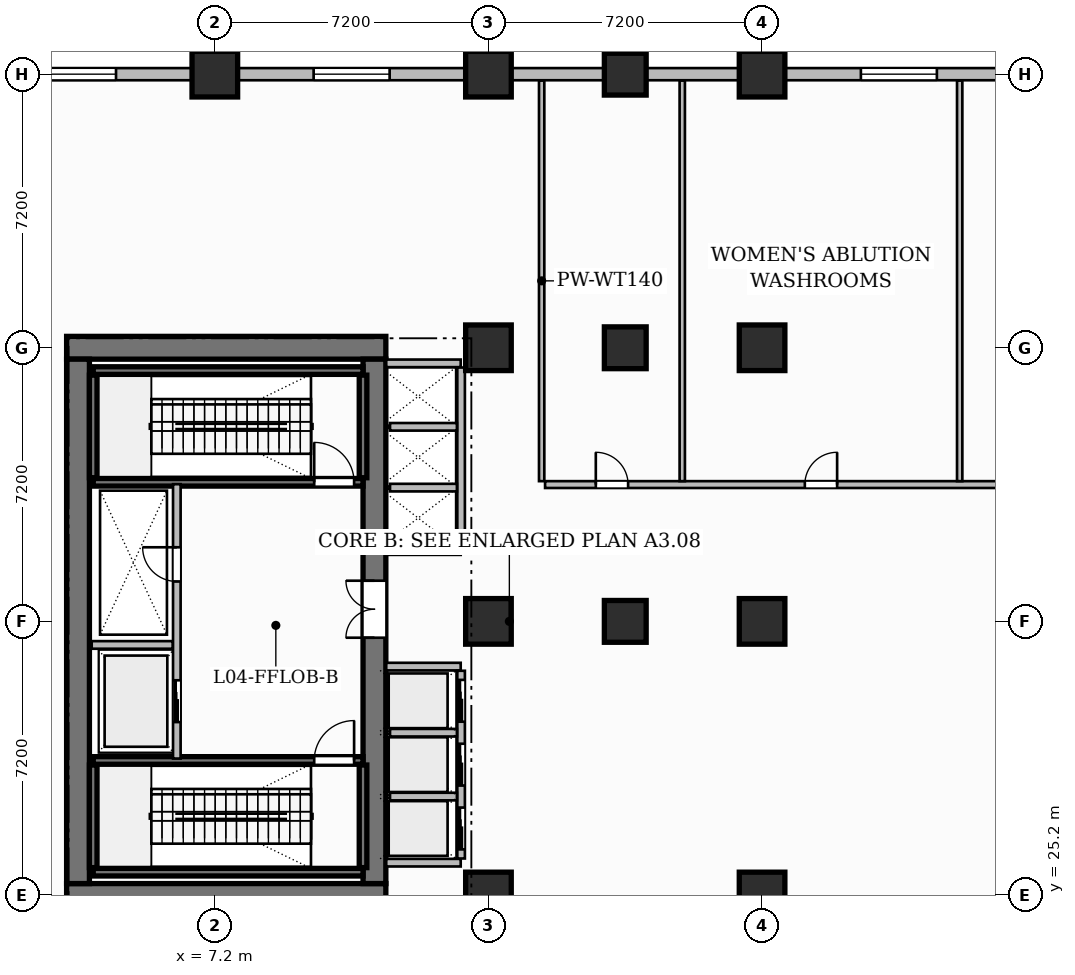
"""IFC4 building model, lengths in metres.
Left out: names, types, materials, properties, quantities, classifications, styles, units other than length and angle.
Written with IfcOpenShell. Run it as: python <this file> out.ifc"""

import sys

from ifc_helpers import new_model, si_unit, direction, frame, frame_2d, origin, origin_2d, place, context, subcontext, project, spatial, rectangle, extrude, source, transform, mapped, element, fill, save


model = new_model("IFC4")
c1 = context("Model", 3, precision=1e-05, world=origin(), true_north=direction((0.0, 1.0)))
c2 = subcontext(c1, "Body", "Model", "MODEL_VIEW")
j1 = project(units=[si_unit("LENGTHUNIT", "METRE"), si_unit("PLANEANGLEUNIT", "RADIAN")], contexts=[c1])
p1 = place(None, origin())
s1 = spatial("IfcSite", under=j1, at=p1, CompositionType="ELEMENT")
p2 = place(p1, origin())
s2 = spatial("IfcBuilding", under=s1, at=p2, CompositionType="ELEMENT")
p3 = place(p2, frame((0.0, 0.0, 21.6)))
s3 = spatial("IfcBuildingStorey", under=s2, at=p3, CompositionType="ELEMENT", Elevation=21.6)
for number, where, z_axis, x_axis in (
    (1, (3.3, 25.2, 0.0), (0.0, 0.0, 1.0), (1.0, 0.0, 0.0)),
    (2, (3.3, 39.6, 0.0), (0.0, 0.0, 1.0), (1.0, 0.0, 0.0)),
):
    element("IfcWall", number, at=place(p3, frame(where, z_axis=z_axis, x_axis=x_axis)), inside=s3, PredefinedType="SHEAR", context=c2, shape_type="SweptSolid", body=[
        extrude(rectangle(XDim=8.4, YDim=0.6, at=frame_2d((4.2, 0.0))), origin(), (0.0, 0.0, 1.0), 5.4),
    ])
p4 = place(p3, frame((3.6, 25.5, 0.0), z_axis=(0.0, 0.0, 1.0), x_axis=(0.0, 1.0, 0.0)))
e3 = element("IfcWall", 3, at=p4, inside=s3, PredefinedType="SHEAR", context=c2, shape_type="SweptSolid", body=[
    extrude(rectangle(XDim=13.8, YDim=0.6, at=frame_2d((6.9, 0.0))), origin(), (0.0, 0.0, 1.0), 5.4),
])
p5 = place(p3, frame((11.4, 25.5, 0.0), z_axis=(0.0, 0.0, 1.0), x_axis=(0.0, 1.0, 0.0)))
e4 = element("IfcWall", 4, at=p5, inside=s3, PredefinedType="SHEAR", context=c2, shape_type="SweptSolid", body=[
    extrude(rectangle(XDim=13.8, YDim=0.6, at=frame_2d((6.9, 0.0))), origin(), (0.0, 0.0, 1.0), 5.4),
])
p6 = place(p5, frame((6.47, 0.0, 0.0)))
e5 = element("IfcOpeningElement", 5, at=p6, cuts=e4, PredefinedType="OPENING", context=c2, shape_type="SweptSolid", body=[
    extrude(rectangle(XDim=1.5, YDim=2.2, at=frame_2d((0.75, 1.1))), frame((0.0, 0.31, 0.0), z_axis=(0.0, -1.0, 0.0), x_axis=(1.0, 0.0, 0.0)), (0.0, 0.0, 1.0), 0.62),
])
m1 = source(origin(), c2, "Body", "SweptSolid", [
    extrude(rectangle(XDim=1.2, YDim=1.2, at=origin_2d()), origin(), (0.0, 0.0, 1.0), 5.4),
])
for number, where, z_axis, x_axis in (
    (6, (7.2, 46.8, 0.0), (0.0, 0.0, 1.0), (1.0, 0.0, 0.0)),
    (7, (14.4, 25.2, 0.0), (0.0, 0.0, 1.0), (1.0, 0.0, 0.0)),
    (8, (14.4, 32.4, 0.0), (0.0, 0.0, 1.0), (1.0, 0.0, 0.0)),
    (9, (14.4, 39.6, 0.0), (0.0, 0.0, 1.0), (1.0, 0.0, 0.0)),
    (10, (14.4, 46.8, 0.0), (0.0, 0.0, 1.0), (1.0, 0.0, 0.0)),
    (11, (21.6, 25.2, 0.0), (0.0, 0.0, 1.0), (1.0, 0.0, 0.0)),
    (12, (21.6, 32.4, 0.0), (0.0, 0.0, 1.0), (1.0, 0.0, 0.0)),
    (13, (21.6, 39.6, 0.0), (0.0, 0.0, 1.0), (1.0, 0.0, 0.0)),
    (14, (21.6, 46.8, 0.0), (0.0, 0.0, 1.0), (1.0, 0.0, 0.0)),
):
    element("IfcColumn", number, at=place(p3, frame(where, z_axis=z_axis, x_axis=x_axis)), inside=s3, PredefinedType="COLUMN", context=c2, shape_type="MappedRepresentation", body=[
        mapped(m1, transform((0.0, 0.0, 0.0), scale=1.0)),
    ])
m2 = source(origin(), c2, "Body", "SweptSolid", [
    extrude(rectangle(XDim=1.1, YDim=1.1, at=origin_2d()), origin(), (0.0, 0.0, 1.0), 5.4),
])
for number, where, z_axis, x_axis in (
    (15, (18.0, 32.4, 0.0), (0.0, 0.0, 1.0), (1.0, 0.0, 0.0)),
    (16, (18.0, 39.6, 0.0), (0.0, 0.0, 1.0), (1.0, 0.0, 0.0)),
    (17, (18.0, 46.8, 0.0), (0.0, 0.0, 1.0), (1.0, 0.0, 0.0)),
):
    element("IfcColumn", number, at=place(p3, frame(where, z_axis=z_axis, x_axis=x_axis)), inside=s3, PredefinedType="COLUMN", context=c2, shape_type="MappedRepresentation", body=[
        mapped(m2, transform((0.0, 0.0, 0.0), scale=1.0)),
    ])
p7 = place(p3, frame((4.0, 25.8, 0.0), z_axis=(0.0, 0.0, 1.0), x_axis=(1.0, 0.0, 0.0)))
e18 = element("IfcWall", 18, at=p7, inside=s3, PredefinedType="SHEAR", context=c2, shape_type="SweptSolid", body=[
    extrude(rectangle(XDim=7.1, YDim=0.2, at=frame_2d((3.55, 0.0))), origin(), (0.0, 0.0, 1.0), 5.4),
])
for number, where, z_axis, x_axis in (
    (19, (4.0, 25.92, 0.0), (0.0, 0.0, 1.0), (0.0, 1.0, 0.0)),
    (20, (11.1, 25.92, 0.0), (0.0, 0.0, 1.0), (0.0, 1.0, 0.0)),
):
    element("IfcWall", number, at=place(p3, frame(where, z_axis=z_axis, x_axis=x_axis)), inside=s3, PredefinedType="SHEAR", context=c2, shape_type="SweptSolid", body=[
        extrude(rectangle(XDim=2.7, YDim=0.2, at=frame_2d((1.35, 0.0))), origin(), (0.0, 0.0, 1.0), 5.4),
    ])
p8 = place(p3, frame((4.0, 28.74, 0.0), z_axis=(0.0, 0.0, 1.0), x_axis=(1.0, 0.0, 0.0)))
e21 = element("IfcWall", 21, at=p8, inside=s3, PredefinedType="SHEAR", context=c2, shape_type="SweptSolid", body=[
    extrude(rectangle(XDim=7.1, YDim=0.2, at=frame_2d((3.55, 0.0))), origin(), (0.0, 0.0, 1.0), 5.4),
])
p9 = place(p8, frame((5.815, 0.0, 0.0)))
e22 = element("IfcOpeningElement", 22, at=p9, cuts=e21, PredefinedType="OPENING", context=c2, shape_type="SweptSolid", body=[
    extrude(rectangle(XDim=1.05, YDim=2.2, at=frame_2d((0.525, 1.1))), frame((0.0, 0.11, 0.0), z_axis=(0.0, -1.0, 0.0), x_axis=(1.0, 0.0, 0.0)), (0.0, 0.0, 1.0), 0.22),
])
p10 = place(p3, frame((4.0, 39.0, 0.0), z_axis=(0.0, 0.0, 1.0), x_axis=(1.0, 0.0, 0.0)))
e23 = element("IfcWall", 23, at=p10, inside=s3, PredefinedType="SHEAR", context=c2, shape_type="SweptSolid", body=[
    extrude(rectangle(XDim=7.1, YDim=0.2, at=frame_2d((3.55, 0.0))), origin(), (0.0, 0.0, 1.0), 5.4),
])
for number, where, z_axis, x_axis in (
    (24, (4.0, 36.18, 0.0), (0.0, 0.0, 1.0), (0.0, 1.0, 0.0)),
    (25, (11.1, 36.18, 0.0), (0.0, 0.0, 1.0), (0.0, 1.0, 0.0)),
):
    element("IfcWall", number, at=place(p3, frame(where, z_axis=z_axis, x_axis=x_axis)), inside=s3, PredefinedType="SHEAR", context=c2, shape_type="SweptSolid", body=[
        extrude(rectangle(XDim=2.7, YDim=0.2, at=frame_2d((1.35, 0.0))), origin(), (0.0, 0.0, 1.0), 5.4),
    ])
p11 = place(p3, frame((4.0, 36.06, 0.0), z_axis=(0.0, 0.0, 1.0), x_axis=(1.0, 0.0, 0.0)))
e26 = element("IfcWall", 26, at=p11, inside=s3, PredefinedType="SHEAR", context=c2, shape_type="SweptSolid", body=[
    extrude(rectangle(XDim=7.1, YDim=0.2, at=frame_2d((3.55, 0.0))), origin(), (0.0, 0.0, 1.0), 5.4),
])
p12 = place(p11, frame((5.815, 0.0, 0.0)))
e27 = element("IfcOpeningElement", 27, at=p12, cuts=e26, PredefinedType="OPENING", context=c2, shape_type="SweptSolid", body=[
    extrude(rectangle(XDim=1.05, YDim=2.2, at=frame_2d((0.525, 1.1))), frame((0.0, 0.11, 0.0), z_axis=(0.0, -1.0, 0.0), x_axis=(1.0, 0.0, 0.0)), (0.0, 0.0, 1.0), 0.22),
])
p13 = place(p3, frame((6.2, 28.79, 0.0), z_axis=(0.0, 0.0, 1.0), x_axis=(0.0, 1.0, 0.0)))
e28 = element("IfcWall", 28, at=p13, inside=s3, PredefinedType="PARTITIONING", context=c2, shape_type="SweptSolid", body=[
    extrude(rectangle(XDim=7.22, YDim=0.2, at=frame_2d((3.61, 0.0))), origin(), (0.0, 0.0, 1.0), 5.1),
])
p14 = place(p13, frame((4.66, 0.0, 0.0)))
e29 = element("IfcOpeningElement", 29, at=p14, cuts=e28, PredefinedType="OPENING", context=c2, shape_type="SweptSolid", body=[
    extrude(rectangle(XDim=0.9, YDim=2.1, at=frame_2d((0.45, 1.05))), frame((0.0, 0.11, 0.0), z_axis=(0.0, -1.0, 0.0), x_axis=(1.0, 0.0, 0.0)), (0.0, 0.0, 1.0), 0.22),
])
p15 = place(p13, frame((0.96, 0.0, 0.0)))
e30 = element("IfcOpeningElement", 30, at=p15, cuts=e28, PredefinedType="OPENING", context=c2, shape_type="SweptSolid", body=[
    extrude(rectangle(XDim=1.1, YDim=2.2, at=frame_2d((0.55, 1.1))), frame((0.0, 0.11, 0.0), z_axis=(0.0, -1.0, 0.0), x_axis=(1.0, 0.0, 0.0)), (0.0, 0.0, 1.0), 0.22),
])
p16 = place(p3, frame((3.96, 31.78, 0.0), z_axis=(0.0, 0.0, 1.0), x_axis=(1.0, 0.0, 0.0)))
e31 = element("IfcWall", 31, at=p16, inside=s3, PredefinedType="PARTITIONING", context=c2, shape_type="SweptSolid", body=[
    extrude(rectangle(XDim=2.13, YDim=0.2, at=frame_2d((1.065, 0.0))), origin(), (0.0, 0.0, 1.0), 5.1),
])
for number, where, z_axis, x_axis in (
    (32, (11.71, 26.05, 0.0), (0.0, 0.0, 1.0), (1.0, 0.0, 0.0)),
    (33, (11.71, 31.21, 0.0), (0.0, 0.0, 1.0), (1.0, 0.0, 0.0)),
):
    element("IfcWall", number, at=place(p3, frame(where, z_axis=z_axis, x_axis=x_axis)), inside=s3, PredefinedType="PARTITIONING", context=c2, shape_type="SweptSolid", body=[
        extrude(rectangle(XDim=1.96, YDim=0.2, at=frame_2d((0.98, 0.0))), origin(), (0.0, 0.0, 1.0), 5.1),
    ])
p17 = place(p3, frame((13.68, 26.16, 0.0), z_axis=(0.0, 0.0, 1.0), x_axis=(0.0, 1.0, 0.0)))
e34 = element("IfcWall", 34, at=p17, inside=s3, PredefinedType="PARTITIONING", context=c2, shape_type="SweptSolid", body=[
    extrude(rectangle(XDim=4.94, YDim=0.2, at=frame_2d((2.47, 0.0))), origin(), (0.0, 0.0, 1.0), 5.1),
])
p18 = place(p17, frame((0.24, 0.0, 0.0)))
e35 = element("IfcOpeningElement", 35, at=p18, cuts=e34, PredefinedType="OPENING", context=c2, shape_type="SweptSolid", body=[
    extrude(rectangle(XDim=1.1, YDim=2.2, at=frame_2d((0.55, 1.1))), frame((0.0, 0.11, 0.0), z_axis=(0.0, -1.0, 0.0), x_axis=(1.0, 0.0, 0.0)), (0.0, 0.0, 1.0), 0.22),
])
p19 = place(p17, frame((1.92, 0.0, 0.0)))
e36 = element("IfcOpeningElement", 36, at=p19, cuts=e34, PredefinedType="OPENING", context=c2, shape_type="SweptSolid", body=[
    extrude(rectangle(XDim=1.1, YDim=2.2, at=frame_2d((0.55, 1.1))), frame((0.0, 0.11, 0.0), z_axis=(0.0, -1.0, 0.0), x_axis=(1.0, 0.0, 0.0)), (0.0, 0.0, 1.0), 0.22),
])
p20 = place(p17, frame((3.6, 0.0, 0.0)))
e37 = element("IfcOpeningElement", 37, at=p20, cuts=e34, PredefinedType="OPENING", context=c2, shape_type="SweptSolid", body=[
    extrude(rectangle(XDim=1.1, YDim=2.2, at=frame_2d((0.55, 1.1))), frame((0.0, 0.11, 0.0), z_axis=(0.0, -1.0, 0.0), x_axis=(1.0, 0.0, 0.0)), (0.0, 0.0, 1.0), 0.22),
])
for number, where, z_axis, x_axis in (
    (38, (11.81, 27.79, 0.0), (0.0, 0.0, 1.0), (1.0, 0.0, 0.0)),
    (39, (11.81, 29.47, 0.0), (0.0, 0.0, 1.0), (1.0, 0.0, 0.0)),
):
    element("IfcWall", number, at=place(p3, frame(where, z_axis=z_axis, x_axis=x_axis)), inside=s3, PredefinedType="PARTITIONING", context=c2, shape_type="SweptSolid", body=[
        extrude(rectangle(XDim=1.76, YDim=0.2, at=frame_2d((0.88, 0.0))), origin(), (0.0, 0.0, 1.0), 5.1),
    ])
for number, where, z_axis, x_axis in (
    (40, (11.71, 34.25, 0.0), (0.0, 0.0, 1.0), (1.0, 0.0, 0.0)),
    (41, (11.71, 39.19, 0.0), (0.0, 0.0, 1.0), (1.0, 0.0, 0.0)),
):
    element("IfcWall", number, at=place(p3, frame(where, z_axis=z_axis, x_axis=x_axis)), inside=s3, PredefinedType="PARTITIONING", context=c2, shape_type="SweptSolid", body=[
        extrude(rectangle(XDim=1.96, YDim=0.2, at=frame_2d((0.98, 0.0))), origin(), (0.0, 0.0, 1.0), 5.1),
    ])
p21 = place(p3, frame((13.68, 34.36, 0.0), z_axis=(0.0, 0.0, 1.0), x_axis=(0.0, 1.0, 0.0)))
e42 = element("IfcWall", 42, at=p21, inside=s3, PredefinedType="PARTITIONING", context=c2, shape_type="SweptSolid", body=[
    extrude(rectangle(XDim=4.72, YDim=0.2, at=frame_2d((2.36, 0.0))), origin(), (0.0, 0.0, 1.0), 5.1),
])
for number, where, z_axis, x_axis in (
    (43, (11.81, 35.92, 0.0), (0.0, 0.0, 1.0), (1.0, 0.0, 0.0)),
    (44, (11.81, 37.52, 0.0), (0.0, 0.0, 1.0), (1.0, 0.0, 0.0)),
):
    element("IfcWall", number, at=place(p3, frame(where, z_axis=z_axis, x_axis=x_axis)), inside=s3, PredefinedType="PARTITIONING", context=c2, shape_type="SweptSolid", body=[
        extrude(rectangle(XDim=1.76, YDim=0.2, at=frame_2d((0.88, 0.0))), origin(), (0.0, 0.0, 1.0), 5.1),
    ])
p22 = place(p3, frame((15.8, 36.09, 0.0), z_axis=(0.0, 0.0, 1.0), x_axis=(0.0, 1.0, 0.0)))
e45 = element("IfcWall", 45, at=p22, inside=s3, PredefinedType="PARTITIONING", context=c2, shape_type="SweptSolid", body=[
    extrude(rectangle(XDim=10.542, YDim=0.14, at=frame_2d((5.271, 0.0))), origin(), (0.0, 0.0, 1.0), 5.1),
])
p23 = place(p3, frame((15.89, 36.0, 0.0), z_axis=(0.0, 0.0, 1.0), x_axis=(1.0, 0.0, 0.0)))
e46 = element("IfcWall", 46, at=p23, inside=s3, PredefinedType="PARTITIONING", context=c2, shape_type="SweptSolid", body=[
    extrude(rectangle(XDim=56.47, YDim=0.18, at=frame_2d((28.235, 0.0))), origin(), (0.0, 0.0, 1.0), 2.85),
])
p24 = place(p23, frame((1.335, 0.0, 0.0)))
e47 = element("IfcOpeningElement", 47, at=p24, cuts=e46, PredefinedType="OPENING", context=c2, shape_type="SweptSolid", body=[
    extrude(rectangle(XDim=0.85, YDim=2.1, at=frame_2d((0.425, 1.05))), frame((0.0, 0.1, 0.0), z_axis=(0.0, -1.0, 0.0), x_axis=(1.0, 0.0, 0.0)), (0.0, 0.0, 1.0), 0.2),
])
p25 = place(p23, frame((6.835, 0.0, 0.0)))
e48 = element("IfcOpeningElement", 48, at=p25, cuts=e46, PredefinedType="OPENING", context=c2, shape_type="SweptSolid", body=[
    extrude(rectangle(XDim=0.85, YDim=2.1, at=frame_2d((0.425, 1.05))), frame((0.0, 0.1, 0.0), z_axis=(0.0, -1.0, 0.0), x_axis=(1.0, 0.0, 0.0)), (0.0, 0.0, 1.0), 0.2),
])
p26 = place(p23, frame((16.31, 0.0, 0.0)))
e49 = element("IfcOpeningElement", 49, at=p26, cuts=e46, PredefinedType="OPENING", context=c2, shape_type="SweptSolid", body=[
    extrude(rectangle(XDim=1.6, YDim=2.4, at=frame_2d((0.8, 1.2))), frame((0.0, 0.1, 0.0), z_axis=(0.0, -1.0, 0.0), x_axis=(1.0, 0.0, 0.0)), (0.0, 0.0, 1.0), 0.2),
])
p27 = place(p23, frame((29.01, 0.0, 0.0)))
e50 = element("IfcOpeningElement", 50, at=p27, cuts=e46, PredefinedType="OPENING", context=c2, shape_type="SweptSolid", body=[
    extrude(rectangle(XDim=1.6, YDim=2.4, at=frame_2d((0.8, 1.2))), frame((0.0, 0.1, 0.0), z_axis=(0.0, -1.0, 0.0), x_axis=(1.0, 0.0, 0.0)), (0.0, 0.0, 1.0), 0.2),
])
p28 = place(p23, frame((40.91, 0.0, 0.0)))
e51 = element("IfcOpeningElement", 51, at=p28, cuts=e46, PredefinedType="OPENING", context=c2, shape_type="SweptSolid", body=[
    extrude(rectangle(XDim=1.6, YDim=2.4, at=frame_2d((0.8, 1.2))), frame((0.0, 0.1, 0.0), z_axis=(0.0, -1.0, 0.0), x_axis=(1.0, 0.0, 0.0)), (0.0, 0.0, 1.0), 0.2),
])
p29 = place(p23, frame((47.86, 0.0, 0.0)))
e52 = element("IfcOpeningElement", 52, at=p29, cuts=e46, PredefinedType="OPENING", context=c2, shape_type="SweptSolid", body=[
    extrude(rectangle(XDim=0.85, YDim=2.1, at=frame_2d((0.425, 1.05))), frame((0.0, 0.1, 0.0), z_axis=(0.0, -1.0, 0.0), x_axis=(1.0, 0.0, 0.0)), (0.0, 0.0, 1.0), 0.2),
])
p30 = place(p23, frame((52.585, 0.0, 0.0)))
e53 = element("IfcOpeningElement", 53, at=p30, cuts=e46, PredefinedType="OPENING", context=c2, shape_type="SweptSolid", body=[
    extrude(rectangle(XDim=0.85, YDim=2.1, at=frame_2d((0.425, 1.05))), frame((0.0, 0.1, 0.0), z_axis=(0.0, -1.0, 0.0), x_axis=(1.0, 0.0, 0.0)), (0.0, 0.0, 1.0), 0.2),
])
for number, where, z_axis, x_axis in (
    (54, (19.5, 36.09, 0.0), (0.0, 0.0, 1.0), (0.0, 1.0, 0.0)),
    (55, (26.8, 36.09, 0.0), (0.0, 0.0, 1.0), (0.0, 1.0, 0.0)),
):
    element("IfcWall", number, at=place(p3, frame(where, z_axis=z_axis, x_axis=x_axis)), inside=s3, PredefinedType="PARTITIONING", context=c2, shape_type="SweptSolid", body=[
        extrude(rectangle(XDim=10.542, YDim=0.14, at=frame_2d((5.271, 0.0))), origin(), (0.0, 0.0, 1.0), 5.1),
    ])
p31 = place(p3, frame((-4.8, 46.8, 0.0), z_axis=(0.0, 0.0, 1.0), x_axis=(1.0, 0.0, 0.0)))
e56 = element("IfcWall", 56, at=p31, inside=s3, PredefinedType="SOLIDWALL", context=c2, shape_type="SweptSolid", body=[
    extrude(rectangle(XDim=33.6, YDim=0.32, at=frame_2d((16.8, 0.0))), origin(), (0.0, 0.0, 1.0), 4.085),
])
p32 = place(p31, frame((1.4, 0.0, 0.75)))
e57 = element("IfcOpeningElement", 57, at=p32, cuts=e56, PredefinedType="OPENING", context=c2, shape_type="SweptSolid", body=[
    extrude(rectangle(XDim=2.0, YDim=2.6, at=frame_2d((1.0, 1.3))), frame((0.0, 0.17, 0.0), z_axis=(0.0, -1.0, 0.0), x_axis=(1.0, 0.0, 0.0)), (0.0, 0.0, 1.0), 0.34),
])
p33 = place(p31, frame((7.4, 0.0, 0.75)))
e58 = element("IfcOpeningElement", 58, at=p33, cuts=e56, PredefinedType="OPENING", context=c2, shape_type="SweptSolid", body=[
    extrude(rectangle(XDim=2.0, YDim=2.6, at=frame_2d((1.0, 1.3))), frame((0.0, 0.17, 0.0), z_axis=(0.0, -1.0, 0.0), x_axis=(1.0, 0.0, 0.0)), (0.0, 0.0, 1.0), 0.34),
])
p34 = place(p31, frame((14.6, 0.0, 0.75)))
e59 = element("IfcOpeningElement", 59, at=p34, cuts=e56, PredefinedType="OPENING", context=c2, shape_type="SweptSolid", body=[
    extrude(rectangle(XDim=2.0, YDim=2.6, at=frame_2d((1.0, 1.3))), frame((0.0, 0.17, 0.0), z_axis=(0.0, -1.0, 0.0), x_axis=(1.0, 0.0, 0.0)), (0.0, 0.0, 1.0), 0.34),
])
p35 = place(p31, frame((29.0, 0.0, 0.75)))
e60 = element("IfcOpeningElement", 60, at=p35, cuts=e56, PredefinedType="OPENING", context=c2, shape_type="SweptSolid", body=[
    extrude(rectangle(XDim=2.0, YDim=2.6, at=frame_2d((1.0, 1.3))), frame((0.0, 0.17, 0.0), z_axis=(0.0, -1.0, 0.0), x_axis=(1.0, 0.0, 0.0)), (0.0, 0.0, 1.0), 0.34),
])
m3 = source(origin(), c2, "Body", "SweptSolid", [
    extrude(rectangle(XDim=1.05, YDim=2.2, at=frame_2d((0.525, 1.1))), frame((0.0, 0.025, 0.0), z_axis=(0.0, -1.0, 0.0), x_axis=(1.0, 0.0, 0.0)), (0.0, 0.0, 1.0), 0.05),
])
p36 = place(p9, origin())
e61 = element("IfcDoor", 61, at=p36, inside=s3, OperationType="SINGLE_SWING_RIGHT", PredefinedType="DOOR", context=c2, shape_type="MappedRepresentation", body=[
    mapped(m3, transform((0.0, 0.0, 0.0), scale=1.0)),
])
fill(e22, e61)
p37 = place(p12, origin())
e62 = element("IfcDoor", 62, at=p37, inside=s3, OperationType="SINGLE_SWING_LEFT", PredefinedType="DOOR", context=c2, shape_type="MappedRepresentation", body=[
    mapped(m3, transform((0.0, 0.0, 0.0), scale=1.0)),
])
fill(e27, e62)
m4 = source(origin(), c2, "Body", "SweptSolid", [
    extrude(rectangle(XDim=0.9, YDim=2.1, at=frame_2d((0.45, 1.05))), frame((0.0, 0.025, 0.0), z_axis=(0.0, -1.0, 0.0), x_axis=(1.0, 0.0, 0.0)), (0.0, 0.0, 1.0), 0.05),
])
p38 = place(p14, origin())
e63 = element("IfcDoor", 63, at=p38, inside=s3, OperationType="SINGLE_SWING_RIGHT", PredefinedType="DOOR", context=c2, shape_type="MappedRepresentation", body=[
    mapped(m4, transform((0.0, 0.0, 0.0), scale=1.0)),
])
fill(e29, e63)
m5 = source(origin(), c2, "Body", "SweptSolid", [
    extrude(rectangle(XDim=1.5, YDim=2.2, at=frame_2d((0.75, 1.1))), frame((0.0, 0.025, 0.0), z_axis=(0.0, -1.0, 0.0), x_axis=(1.0, 0.0, 0.0)), (0.0, 0.0, 1.0), 0.05),
])
p39 = place(p6, origin())
e64 = element("IfcDoor", 64, at=p39, inside=s3, OperationType="DOUBLE_DOOR_SINGLE_SWING", PredefinedType="DOOR", context=c2, shape_type="MappedRepresentation", body=[
    mapped(m5, transform((0.0, 0.0, 0.0), scale=1.0)),
])
fill(e5, e64)
m6 = source(origin(), c2, "Body", "SweptSolid", [
    extrude(rectangle(XDim=0.85, YDim=2.1, at=frame_2d((0.425, 1.05))), frame((0.0, 0.025, 0.0), z_axis=(0.0, -1.0, 0.0), x_axis=(1.0, 0.0, 0.0)), (0.0, 0.0, 1.0), 0.05),
])
p40 = place(p24, origin())
e65 = element("IfcDoor", 65, at=p40, inside=s3, OperationType="SINGLE_SWING_LEFT", PredefinedType="DOOR", context=c2, shape_type="MappedRepresentation", body=[
    mapped(m6, transform((0.0, 0.0, 0.0), scale=1.0)),
])
fill(e47, e65)
p41 = place(p25, origin())
e66 = element("IfcDoor", 66, at=p41, inside=s3, OperationType="SINGLE_SWING_RIGHT", PredefinedType="DOOR", context=c2, shape_type="MappedRepresentation", body=[
    mapped(m6, transform((0.0, 0.0, 0.0), scale=1.0)),
])
fill(e48, e66)
m7 = source(origin(), c2, "Body", "SweptSolid", [
    extrude(rectangle(XDim=1.1, YDim=2.2, at=frame_2d((0.55, 1.1))), frame((0.0, 0.025, 0.0), z_axis=(0.0, -1.0, 0.0), x_axis=(1.0, 0.0, 0.0)), (0.0, 0.0, 1.0), 0.05),
])
p42 = place(p15, origin())
e67 = element("IfcDoor", 67, at=p42, inside=s3, OperationType="SLIDING_TO_LEFT", PredefinedType="DOOR", context=c2, shape_type="MappedRepresentation", body=[
    mapped(m7, transform((0.0, 0.0, 0.0), scale=1.0)),
])
fill(e30, e67)
p43 = place(p18, origin())
e68 = element("IfcDoor", 68, at=p43, inside=s3, OperationType="SLIDING_TO_LEFT", PredefinedType="DOOR", context=c2, shape_type="MappedRepresentation", body=[
    mapped(m7, transform((0.0, 0.0, 0.0), scale=1.0)),
])
fill(e35, e68)
p44 = place(p19, origin())
e69 = element("IfcDoor", 69, at=p44, inside=s3, OperationType="SLIDING_TO_LEFT", PredefinedType="DOOR", context=c2, shape_type="MappedRepresentation", body=[
    mapped(m7, transform((0.0, 0.0, 0.0), scale=1.0)),
])
fill(e36, e69)
p45 = place(p20, origin())
e70 = element("IfcDoor", 70, at=p45, inside=s3, OperationType="SLIDING_TO_LEFT", PredefinedType="DOOR", context=c2, shape_type="MappedRepresentation", body=[
    mapped(m7, transform((0.0, 0.0, 0.0), scale=1.0)),
])
fill(e37, e70)
m8 = source(origin(), c2, "Body", "SweptSolid", [
    extrude(rectangle(XDim=2.0, YDim=2.6, at=frame_2d((1.0, 1.3))), frame((0.0, 0.03, 0.0), z_axis=(0.0, -1.0, 0.0), x_axis=(1.0, 0.0, 0.0)), (0.0, 0.0, 1.0), 0.06),
])
p46 = place(p33, origin())
e71 = element("IfcWindow", 71, at=p46, inside=s3, PartitioningType="DOUBLE_PANEL_VERTICAL", PredefinedType="WINDOW", context=c2, shape_type="MappedRepresentation", body=[
    mapped(m8, transform((0.0, 0.0, 0.0), scale=1.0)),
])
fill(e58, e71)
p47 = place(p34, origin())
e72 = element("IfcWindow", 72, at=p47, inside=s3, PartitioningType="DOUBLE_PANEL_VERTICAL", PredefinedType="WINDOW", context=c2, shape_type="MappedRepresentation", body=[
    mapped(m8, transform((0.0, 0.0, 0.0), scale=1.0)),
])
fill(e59, e72)
p48 = place(p35, origin())
e73 = element("IfcWindow", 73, at=p48, inside=s3, PartitioningType="DOUBLE_PANEL_VERTICAL", PredefinedType="WINDOW", context=c2, shape_type="MappedRepresentation", body=[
    mapped(m8, transform((0.0, 0.0, 0.0), scale=1.0)),
])
fill(e60, e73)
save(model, sys.argv[1])
